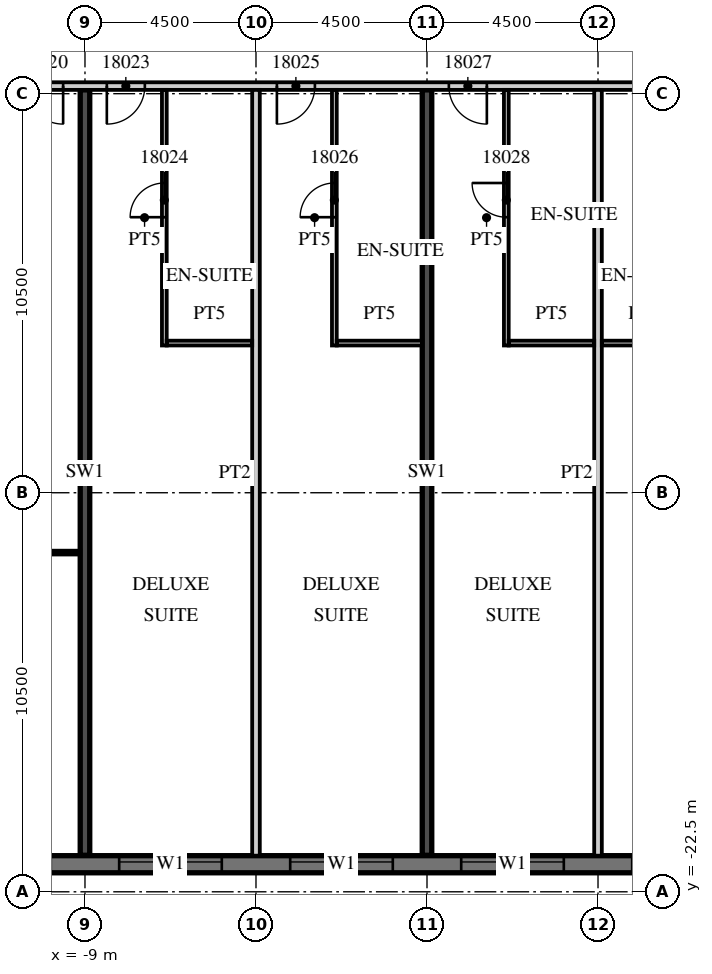
"""IFC4 building model, lengths in metres.
Left out: names, types, materials, properties, quantities, classifications, styles, units other than length and angle.
Written with IfcOpenShell. Run it as: python <this file> out.ifc"""

import sys

from ifc_helpers import new_model, si_unit, direction, frame, frame_2d, origin, place, context, subcontext, project, spatial, rectangle, extrude, element, fill, save


model = new_model("IFC4")
c1 = context("Model", 3, precision=1e-05, world=origin(), true_north=direction((0.0, 1.0)))
c2 = subcontext(c1, "Body", "Model", "MODEL_VIEW")
j1 = project(units=[si_unit("LENGTHUNIT", "METRE"), si_unit("PLANEANGLEUNIT", "RADIAN")], contexts=[c1])
p1 = place(None, origin())
s1 = spatial("IfcSite", under=j1, at=p1, CompositionType="ELEMENT")
p2 = place(p1, origin())
s2 = spatial("IfcBuilding", under=s1, at=p2, CompositionType="ELEMENT")
p3 = place(p2, frame((0.0, 0.0, 89.7)))
s3 = spatial("IfcBuildingStorey", under=s2, at=p3, CompositionType="ELEMENT", Elevation=89.7)
for number, where, z_axis, x_axis in (
    (1, (-9.0, -21.54, 0.0), (0.0, 0.0, 1.0), (0.0, 1.0, 0.0)),
    (2, (0.0, -21.54, 0.0), (0.0, 0.0, 1.0), (0.0, 1.0, 0.0)),
):
    element("IfcWall", number, at=place(p3, frame(where, z_axis=z_axis, x_axis=x_axis)), inside=s3, PredefinedType="SHEAR", context=c2, shape_type="SweptSolid", body=[
        extrude(rectangle(XDim=20.14, YDim=0.25, at=frame_2d((10.07, 0.0))), origin(), (0.0, 0.0, 1.0), 3.3),
    ])
p4 = place(p3, frame((-13.5, -21.775, 0.0), z_axis=(0.0, 0.0, 1.0), x_axis=(1.0, 0.0, 0.0)))
e3 = element("IfcWall", 3, at=p4, inside=s3, PredefinedType="SOLIDWALL", context=c2, shape_type="SweptSolid", body=[
    extrude(rectangle(XDim=54.5, YDim=0.45, at=frame_2d((27.25, 0.0))), origin(), (0.0, 0.0, 1.0), 3.02),
])
p5 = place(p4, frame((0.9, 0.0, 0.45)))
e4 = element("IfcOpeningElement", 4, at=p5, cuts=e3, PredefinedType="OPENING", context=c2, shape_type="SweptSolid", body=[
    extrude(rectangle(XDim=2.7, YDim=2.25, at=frame_2d((1.35, 1.125))), frame((0.0, 0.235, 0.0), z_axis=(0.0, -1.0, 0.0), x_axis=(1.0, 0.0, 0.0)), (0.0, 0.0, 1.0), 0.47),
])
p6 = place(p4, frame((5.4, 0.0, 0.45)))
e5 = element("IfcOpeningElement", 5, at=p6, cuts=e3, PredefinedType="OPENING", context=c2, shape_type="SweptSolid", body=[
    extrude(rectangle(XDim=2.7, YDim=2.25, at=frame_2d((1.35, 1.125))), frame((0.0, 0.235, 0.0), z_axis=(0.0, -1.0, 0.0), x_axis=(1.0, 0.0, 0.0)), (0.0, 0.0, 1.0), 0.47),
])
p7 = place(p4, frame((9.9, 0.0, 0.45)))
e6 = element("IfcOpeningElement", 6, at=p7, cuts=e3, PredefinedType="OPENING", context=c2, shape_type="SweptSolid", body=[
    extrude(rectangle(XDim=2.7, YDim=2.25, at=frame_2d((1.35, 1.125))), frame((0.0, 0.235, 0.0), z_axis=(0.0, -1.0, 0.0), x_axis=(1.0, 0.0, 0.0)), (0.0, 0.0, 1.0), 0.47),
])
p8 = place(p4, frame((14.4, 0.0, 0.45)))
e7 = element("IfcOpeningElement", 7, at=p8, cuts=e3, PredefinedType="OPENING", context=c2, shape_type="SweptSolid", body=[
    extrude(rectangle(XDim=2.7, YDim=2.25, at=frame_2d((1.35, 1.125))), frame((0.0, 0.235, 0.0), z_axis=(0.0, -1.0, 0.0), x_axis=(1.0, 0.0, 0.0)), (0.0, 0.0, 1.0), 0.47),
])
p9 = place(p4, frame((18.9, 0.0, 0.45)))
e8 = element("IfcOpeningElement", 8, at=p9, cuts=e3, PredefinedType="OPENING", context=c2, shape_type="SweptSolid", body=[
    extrude(rectangle(XDim=2.7, YDim=2.25, at=frame_2d((1.35, 1.125))), frame((0.0, 0.235, 0.0), z_axis=(0.0, -1.0, 0.0), x_axis=(1.0, 0.0, 0.0)), (0.0, 0.0, 1.0), 0.47),
])
p10 = place(p4, frame((23.4, 0.0, 0.45)))
e9 = element("IfcOpeningElement", 9, at=p10, cuts=e3, PredefinedType="OPENING", context=c2, shape_type="SweptSolid", body=[
    extrude(rectangle(XDim=2.7, YDim=2.25, at=frame_2d((1.35, 1.125))), frame((0.0, 0.235, 0.0), z_axis=(0.0, -1.0, 0.0), x_axis=(1.0, 0.0, 0.0)), (0.0, 0.0, 1.0), 0.47),
])
p11 = place(p4, frame((27.9, 0.0, 0.45)))
e10 = element("IfcOpeningElement", 10, at=p11, cuts=e3, PredefinedType="OPENING", context=c2, shape_type="SweptSolid", body=[
    extrude(rectangle(XDim=2.7, YDim=2.25, at=frame_2d((1.35, 1.125))), frame((0.0, 0.235, 0.0), z_axis=(0.0, -1.0, 0.0), x_axis=(1.0, 0.0, 0.0)), (0.0, 0.0, 1.0), 0.47),
])
p12 = place(p4, frame((32.4, 0.0, 0.45)))
e11 = element("IfcOpeningElement", 11, at=p12, cuts=e3, PredefinedType="OPENING", context=c2, shape_type="SweptSolid", body=[
    extrude(rectangle(XDim=2.7, YDim=2.25, at=frame_2d((1.35, 1.125))), frame((0.0, 0.235, 0.0), z_axis=(0.0, -1.0, 0.0), x_axis=(1.0, 0.0, 0.0)), (0.0, 0.0, 1.0), 0.47),
])
p13 = place(p4, frame((36.9, 0.0, 0.45)))
e12 = element("IfcOpeningElement", 12, at=p13, cuts=e3, PredefinedType="OPENING", context=c2, shape_type="SweptSolid", body=[
    extrude(rectangle(XDim=2.7, YDim=2.25, at=frame_2d((1.35, 1.125))), frame((0.0, 0.235, 0.0), z_axis=(0.0, -1.0, 0.0), x_axis=(1.0, 0.0, 0.0)), (0.0, 0.0, 1.0), 0.47),
])
p14 = place(p4, frame((41.4, 0.0, 0.45)))
e13 = element("IfcOpeningElement", 13, at=p14, cuts=e3, PredefinedType="OPENING", context=c2, shape_type="SweptSolid", body=[
    extrude(rectangle(XDim=2.7, YDim=2.25, at=frame_2d((1.35, 1.125))), frame((0.0, 0.235, 0.0), z_axis=(0.0, -1.0, 0.0), x_axis=(1.0, 0.0, 0.0)), (0.0, 0.0, 1.0), 0.47),
])
p15 = place(p4, frame((45.9, 0.0, 0.45)))
e14 = element("IfcOpeningElement", 14, at=p15, cuts=e3, PredefinedType="OPENING", context=c2, shape_type="SweptSolid", body=[
    extrude(rectangle(XDim=2.7, YDim=2.25, at=frame_2d((1.35, 1.125))), frame((0.0, 0.235, 0.0), z_axis=(0.0, -1.0, 0.0), x_axis=(1.0, 0.0, 0.0)), (0.0, 0.0, 1.0), 0.47),
])
p16 = place(p4, frame((50.4, 0.0, 0.45)))
e15 = element("IfcOpeningElement", 15, at=p16, cuts=e3, PredefinedType="OPENING", context=c2, shape_type="SweptSolid", body=[
    extrude(rectangle(XDim=2.7, YDim=2.25, at=frame_2d((1.35, 1.125))), frame((0.0, 0.235, 0.0), z_axis=(0.0, -1.0, 0.0), x_axis=(1.0, 0.0, 0.0)), (0.0, 0.0, 1.0), 0.47),
])
p17 = place(p3, frame((-13.5, -1.3, 0.0), z_axis=(0.0, 0.0, 1.0), x_axis=(1.0, 0.0, 0.0)))
e16 = element("IfcWall", 16, at=p17, inside=s3, PredefinedType="PARTITIONING", context=c2, shape_type="SweptSolid", body=[
    extrude(rectangle(XDim=58.05, YDim=0.2, at=frame_2d((29.025, 0.0))), origin(), (0.0, 0.0, 1.0), 3.02),
])
p18 = place(p17, frame((2.925, 0.0, 0.0)))
e17 = element("IfcOpeningElement", 17, at=p18, cuts=e16, PredefinedType="OPENING", context=c2, shape_type="SweptSolid", body=[
    extrude(rectangle(XDim=1.0, YDim=2.1, at=frame_2d((0.5, 1.05))), frame((0.0, 0.11, 0.0), z_axis=(0.0, -1.0, 0.0), x_axis=(1.0, 0.0, 0.0)), (0.0, 0.0, 1.0), 0.22),
])
p19 = place(p17, frame((5.075, 0.0, 0.0)))
e18 = element("IfcOpeningElement", 18, at=p19, cuts=e16, PredefinedType="OPENING", context=c2, shape_type="SweptSolid", body=[
    extrude(rectangle(XDim=1.0, YDim=2.1, at=frame_2d((0.5, 1.05))), frame((0.0, 0.11, 0.0), z_axis=(0.0, -1.0, 0.0), x_axis=(1.0, 0.0, 0.0)), (0.0, 0.0, 1.0), 0.22),
])
p20 = place(p17, frame((9.55, 0.0, 0.0)))
e19 = element("IfcOpeningElement", 19, at=p20, cuts=e16, PredefinedType="OPENING", context=c2, shape_type="SweptSolid", body=[
    extrude(rectangle(XDim=1.0, YDim=2.1, at=frame_2d((0.5, 1.05))), frame((0.0, 0.11, 0.0), z_axis=(0.0, -1.0, 0.0), x_axis=(1.0, 0.0, 0.0)), (0.0, 0.0, 1.0), 0.22),
])
p21 = place(p17, frame((14.075, 0.0, 0.0)))
e20 = element("IfcOpeningElement", 20, at=p21, cuts=e16, PredefinedType="OPENING", context=c2, shape_type="SweptSolid", body=[
    extrude(rectangle(XDim=1.0, YDim=2.1, at=frame_2d((0.5, 1.05))), frame((0.0, 0.11, 0.0), z_axis=(0.0, -1.0, 0.0), x_axis=(1.0, 0.0, 0.0)), (0.0, 0.0, 1.0), 0.22),
])
p22 = place(p17, frame((20.925, 0.0, 0.0)))
e21 = element("IfcOpeningElement", 21, at=p22, cuts=e16, PredefinedType="OPENING", context=c2, shape_type="SweptSolid", body=[
    extrude(rectangle(XDim=1.0, YDim=2.1, at=frame_2d((0.5, 1.05))), frame((0.0, 0.11, 0.0), z_axis=(0.0, -1.0, 0.0), x_axis=(1.0, 0.0, 0.0)), (0.0, 0.0, 1.0), 0.22),
])
p23 = place(p17, frame((27.862, 0.0, 0.0)))
e22 = element("IfcOpeningElement", 22, at=p23, cuts=e16, PredefinedType="OPENING", context=c2, shape_type="SweptSolid", body=[
    extrude(rectangle(XDim=1.2, YDim=2.1, at=frame_2d((0.6, 1.05))), frame((0.0, 0.11, 0.0), z_axis=(0.0, -1.0, 0.0), x_axis=(1.0, 0.0, 0.0)), (0.0, 0.0, 1.0), 0.22),
])
p24 = place(p17, frame((34.45, 0.0, 0.0)))
e23 = element("IfcOpeningElement", 23, at=p24, cuts=e16, PredefinedType="OPENING", context=c2, shape_type="SweptSolid", body=[
    extrude(rectangle(XDim=1.0, YDim=2.1, at=frame_2d((0.5, 1.05))), frame((0.0, 0.11, 0.0), z_axis=(0.0, -1.0, 0.0), x_axis=(1.0, 0.0, 0.0)), (0.0, 0.0, 1.0), 0.22),
])
p25 = place(p17, frame((38.925, 0.0, 0.0)))
e24 = element("IfcOpeningElement", 24, at=p25, cuts=e16, PredefinedType="OPENING", context=c2, shape_type="SweptSolid", body=[
    extrude(rectangle(XDim=1.0, YDim=2.1, at=frame_2d((0.5, 1.05))), frame((0.0, 0.11, 0.0), z_axis=(0.0, -1.0, 0.0), x_axis=(1.0, 0.0, 0.0)), (0.0, 0.0, 1.0), 0.22),
])
p26 = place(p17, frame((41.075, 0.0, 0.0)))
e25 = element("IfcOpeningElement", 25, at=p26, cuts=e16, PredefinedType="OPENING", context=c2, shape_type="SweptSolid", body=[
    extrude(rectangle(XDim=1.0, YDim=2.1, at=frame_2d((0.5, 1.05))), frame((0.0, 0.11, 0.0), z_axis=(0.0, -1.0, 0.0), x_axis=(1.0, 0.0, 0.0)), (0.0, 0.0, 1.0), 0.22),
])
p27 = place(p17, frame((45.55, 0.0, 0.0)))
e26 = element("IfcOpeningElement", 26, at=p27, cuts=e16, PredefinedType="OPENING", context=c2, shape_type="SweptSolid", body=[
    extrude(rectangle(XDim=1.0, YDim=2.1, at=frame_2d((0.5, 1.05))), frame((0.0, 0.11, 0.0), z_axis=(0.0, -1.0, 0.0), x_axis=(1.0, 0.0, 0.0)), (0.0, 0.0, 1.0), 0.22),
])
p28 = place(p17, frame((50.075, 0.0, 0.0)))
e27 = element("IfcOpeningElement", 27, at=p28, cuts=e16, PredefinedType="OPENING", context=c2, shape_type="SweptSolid", body=[
    extrude(rectangle(XDim=1.0, YDim=2.1, at=frame_2d((0.5, 1.05))), frame((0.0, 0.11, 0.0), z_axis=(0.0, -1.0, 0.0), x_axis=(1.0, 0.0, 0.0)), (0.0, 0.0, 1.0), 0.22),
])
p29 = place(p17, frame((56.525, 0.0, 0.0)))
e28 = element("IfcOpeningElement", 28, at=p29, cuts=e16, PredefinedType="OPENING", context=c2, shape_type="SweptSolid", body=[
    extrude(rectangle(XDim=1.0, YDim=2.1, at=frame_2d((0.5, 1.05))), frame((0.0, 0.11, 0.0), z_axis=(0.0, -1.0, 0.0), x_axis=(1.0, 0.0, 0.0)), (0.0, 0.0, 1.0), 0.22),
])
p30 = place(p3, frame((-13.4, -13.575, 0.0), z_axis=(0.0, 0.0, 1.0), x_axis=(1.0, 0.0, 0.0)))
e29 = element("IfcWall", 29, at=p30, inside=s3, PredefinedType="PARTITIONING", context=c2, shape_type="SweptSolid", body=[
    extrude(rectangle(XDim=4.275, YDim=0.1, at=frame_2d((2.137, 0.0))), origin(), (0.0, 0.0, 1.0), 3.02),
])
p31 = place(p30, frame((1.988, 0.0, 0.0)))
e30 = element("IfcOpeningElement", 30, at=p31, cuts=e29, PredefinedType="OPENING", context=c2, shape_type="SweptSolid", body=[
    extrude(rectangle(XDim=1.5, YDim=2.1, at=frame_2d((0.75, 1.05))), frame((0.0, 0.06, 0.0), z_axis=(0.0, -1.0, 0.0), x_axis=(1.0, 0.0, 0.0)), (0.0, 0.0, 1.0), 0.12),
])
p32 = place(p3, frame((-4.5, -21.55, 0.0), z_axis=(0.0, 0.0, 1.0), x_axis=(0.0, 1.0, 0.0)))
e31 = element("IfcWall", 31, at=p32, inside=s3, PredefinedType="PARTITIONING", context=c2, shape_type="SweptSolid", body=[
    extrude(rectangle(XDim=20.15, YDim=0.2, at=frame_2d((10.075, 0.0))), origin(), (0.0, 0.0, 1.0), 3.02),
])
p33 = place(p3, frame((-6.912, -8.125, 0.0), z_axis=(0.0, 0.0, 1.0), x_axis=(0.0, 1.0, 0.0)))
e32 = element("IfcWall", 32, at=p33, inside=s3, PredefinedType="PARTITIONING", context=c2, shape_type="SweptSolid", body=[
    extrude(rectangle(XDim=6.725, YDim=0.125, at=frame_2d((3.363, 0.0))), origin(), (0.0, 0.0, 1.0), 3.02),
])
p34 = place(p33, frame((3.375, 0.0, 0.0)))
e33 = element("IfcOpeningElement", 33, at=p34, cuts=e32, PredefinedType="OPENING", context=c2, shape_type="SweptSolid", body=[
    extrude(rectangle(XDim=0.9, YDim=2.1, at=frame_2d((0.45, 1.05))), frame((0.0, 0.073, 0.0), z_axis=(0.0, -1.0, 0.0), x_axis=(1.0, 0.0, 0.0)), (0.0, 0.0, 1.0), 0.145),
])
p35 = place(p3, frame((-6.85, -8.062, 0.0), z_axis=(0.0, 0.0, 1.0), x_axis=(1.0, 0.0, 0.0)))
e34 = element("IfcWall", 34, at=p35, inside=s3, PredefinedType="PARTITIONING", context=c2, shape_type="SweptSolid", body=[
    extrude(rectangle(XDim=2.25, YDim=0.125, at=frame_2d((1.125, 0.0))), origin(), (0.0, 0.0, 1.0), 3.02),
])
p36 = place(p3, frame((-2.438, -8.125, 0.0), z_axis=(0.0, 0.0, 1.0), x_axis=(0.0, 1.0, 0.0)))
e35 = element("IfcWall", 35, at=p36, inside=s3, PredefinedType="PARTITIONING", context=c2, shape_type="SweptSolid", body=[
    extrude(rectangle(XDim=6.725, YDim=0.125, at=frame_2d((3.363, 0.0))), origin(), (0.0, 0.0, 1.0), 3.02),
])
p37 = place(p36, frame((3.375, 0.0, 0.0)))
e36 = element("IfcOpeningElement", 36, at=p37, cuts=e35, PredefinedType="OPENING", context=c2, shape_type="SweptSolid", body=[
    extrude(rectangle(XDim=0.9, YDim=2.1, at=frame_2d((0.45, 1.05))), frame((0.0, 0.073, 0.0), z_axis=(0.0, -1.0, 0.0), x_axis=(1.0, 0.0, 0.0)), (0.0, 0.0, 1.0), 0.145),
])
p38 = place(p3, frame((-2.375, -8.062, 0.0), z_axis=(0.0, 0.0, 1.0), x_axis=(1.0, 0.0, 0.0)))
e37 = element("IfcWall", 37, at=p38, inside=s3, PredefinedType="PARTITIONING", context=c2, shape_type="SweptSolid", body=[
    extrude(rectangle(XDim=2.25, YDim=0.125, at=frame_2d((1.125, 0.0))), origin(), (0.0, 0.0, 1.0), 3.02),
])
p39 = place(p3, frame((4.5, -21.55, 0.0), z_axis=(0.0, 0.0, 1.0), x_axis=(0.0, 1.0, 0.0)))
e38 = element("IfcWall", 38, at=p39, inside=s3, PredefinedType="PARTITIONING", context=c2, shape_type="SweptSolid", body=[
    extrude(rectangle(XDim=20.15, YDim=0.2, at=frame_2d((10.075, 0.0))), origin(), (0.0, 0.0, 1.0), 3.02),
])
p40 = place(p3, frame((2.087, -8.125, 0.0), z_axis=(0.0, 0.0, 1.0), x_axis=(0.0, 1.0, 0.0)))
e39 = element("IfcWall", 39, at=p40, inside=s3, PredefinedType="PARTITIONING", context=c2, shape_type="SweptSolid", body=[
    extrude(rectangle(XDim=6.725, YDim=0.125, at=frame_2d((3.363, 0.0))), origin(), (0.0, 0.0, 1.0), 3.02),
])
p41 = place(p40, frame((3.375, 0.0, 0.0)))
e40 = element("IfcOpeningElement", 40, at=p41, cuts=e39, PredefinedType="OPENING", context=c2, shape_type="SweptSolid", body=[
    extrude(rectangle(XDim=0.9, YDim=2.1, at=frame_2d((0.45, 1.05))), frame((0.0, 0.073, 0.0), z_axis=(0.0, -1.0, 0.0), x_axis=(1.0, 0.0, 0.0)), (0.0, 0.0, 1.0), 0.145),
])
for number, where, z_axis, x_axis in (
    (41, (2.15, -8.062, 0.0), (0.0, 0.0, 1.0), (1.0, 0.0, 0.0)),
    (42, (4.6, -8.062, 0.0), (0.0, 0.0, 1.0), (1.0, 0.0, 0.0)),
):
    element("IfcWall", number, at=place(p3, frame(where, z_axis=z_axis, x_axis=x_axis)), inside=s3, PredefinedType="PARTITIONING", context=c2, shape_type="SweptSolid", body=[
        extrude(rectangle(XDim=2.25, YDim=0.125, at=frame_2d((1.125, 0.0))), origin(), (0.0, 0.0, 1.0), 3.02),
    ])
p42 = place(p6, origin())
e43 = element("IfcWindow", 43, at=p42, inside=s3, PartitioningType="SINGLE_PANEL", PredefinedType="WINDOW", context=c2, shape_type="SweptSolid", body=[
    extrude(rectangle(XDim=2.7, YDim=2.25, at=frame_2d((1.35, 1.125))), frame((0.0, 0.09, 0.0), z_axis=(0.0, -1.0, 0.0), x_axis=(1.0, 0.0, 0.0)), (0.0, 0.0, 1.0), 0.06),
])
fill(e5, e43)
p43 = place(p7, origin())
e44 = element("IfcWindow", 44, at=p43, inside=s3, PartitioningType="SINGLE_PANEL", PredefinedType="WINDOW", context=c2, shape_type="SweptSolid", body=[
    extrude(rectangle(XDim=2.7, YDim=2.25, at=frame_2d((1.35, 1.125))), frame((0.0, 0.09, 0.0), z_axis=(0.0, -1.0, 0.0), x_axis=(1.0, 0.0, 0.0)), (0.0, 0.0, 1.0), 0.06),
])
fill(e6, e44)
p44 = place(p8, origin())
e45 = element("IfcWindow", 45, at=p44, inside=s3, PartitioningType="SINGLE_PANEL", PredefinedType="WINDOW", context=c2, shape_type="SweptSolid", body=[
    extrude(rectangle(XDim=2.7, YDim=2.25, at=frame_2d((1.35, 1.125))), frame((0.0, 0.09, 0.0), z_axis=(0.0, -1.0, 0.0), x_axis=(1.0, 0.0, 0.0)), (0.0, 0.0, 1.0), 0.06),
])
fill(e7, e45)
p45 = place(p18, origin())
e46 = element("IfcDoor", 46, at=p45, inside=s3, OperationType="SINGLE_SWING_RIGHT", PredefinedType="DOOR", context=c2, shape_type="SweptSolid", body=[
    extrude(rectangle(XDim=1.0, YDim=2.1, at=frame_2d((0.5, 1.05))), frame((0.0, 0.025, 0.0), z_axis=(0.0, -1.0, 0.0), x_axis=(1.0, 0.0, 0.0)), (0.0, 0.0, 1.0), 0.05),
])
fill(e17, e46)
p46 = place(p19, origin())
e47 = element("IfcDoor", 47, at=p46, inside=s3, OperationType="SINGLE_SWING_LEFT", PredefinedType="DOOR", context=c2, shape_type="SweptSolid", body=[
    extrude(rectangle(XDim=1.0, YDim=2.1, at=frame_2d((0.5, 1.05))), frame((0.0, 0.025, 0.0), z_axis=(0.0, -1.0, 0.0), x_axis=(1.0, 0.0, 0.0)), (0.0, 0.0, 1.0), 0.05),
])
fill(e18, e47)
p47 = place(p34, origin())
e48 = element("IfcDoor", 48, at=p47, inside=s3, OperationType="SINGLE_SWING_LEFT", PredefinedType="DOOR", context=c2, shape_type="SweptSolid", body=[
    extrude(rectangle(XDim=0.9, YDim=2.1, at=frame_2d((0.45, 1.05))), frame((0.0, 0.025, 0.0), z_axis=(0.0, -1.0, 0.0), x_axis=(1.0, 0.0, 0.0)), (0.0, 0.0, 1.0), 0.05),
])
fill(e33, e48)
p48 = place(p20, origin())
e49 = element("IfcDoor", 49, at=p48, inside=s3, OperationType="SINGLE_SWING_LEFT", PredefinedType="DOOR", context=c2, shape_type="SweptSolid", body=[
    extrude(rectangle(XDim=1.0, YDim=2.1, at=frame_2d((0.5, 1.05))), frame((0.0, 0.025, 0.0), z_axis=(0.0, -1.0, 0.0), x_axis=(1.0, 0.0, 0.0)), (0.0, 0.0, 1.0), 0.05),
])
fill(e19, e49)
p49 = place(p37, origin())
e50 = element("IfcDoor", 50, at=p49, inside=s3, OperationType="SINGLE_SWING_LEFT", PredefinedType="DOOR", context=c2, shape_type="SweptSolid", body=[
    extrude(rectangle(XDim=0.9, YDim=2.1, at=frame_2d((0.45, 1.05))), frame((0.0, 0.025, 0.0), z_axis=(0.0, -1.0, 0.0), x_axis=(1.0, 0.0, 0.0)), (0.0, 0.0, 1.0), 0.05),
])
fill(e36, e50)
p50 = place(p21, origin())
e51 = element("IfcDoor", 51, at=p50, inside=s3, OperationType="SINGLE_SWING_RIGHT", PredefinedType="DOOR", context=c2, shape_type="SweptSolid", body=[
    extrude(rectangle(XDim=1.0, YDim=2.1, at=frame_2d((0.5, 1.05))), frame((0.0, 0.025, 0.0), z_axis=(0.0, -1.0, 0.0), x_axis=(1.0, 0.0, 0.0)), (0.0, 0.0, 1.0), 0.05),
])
fill(e20, e51)
p51 = place(p41, origin())
e52 = element("IfcDoor", 52, at=p51, inside=s3, OperationType="SINGLE_SWING_RIGHT", PredefinedType="DOOR", context=c2, shape_type="SweptSolid", body=[
    extrude(rectangle(XDim=0.9, YDim=2.1, at=frame_2d((0.45, 1.05))), frame((0.0, 0.025, 0.0), z_axis=(0.0, -1.0, 0.0), x_axis=(1.0, 0.0, 0.0)), (0.0, 0.0, 1.0), 0.05),
])
fill(e40, e52)
save(model, sys.argv[1])
